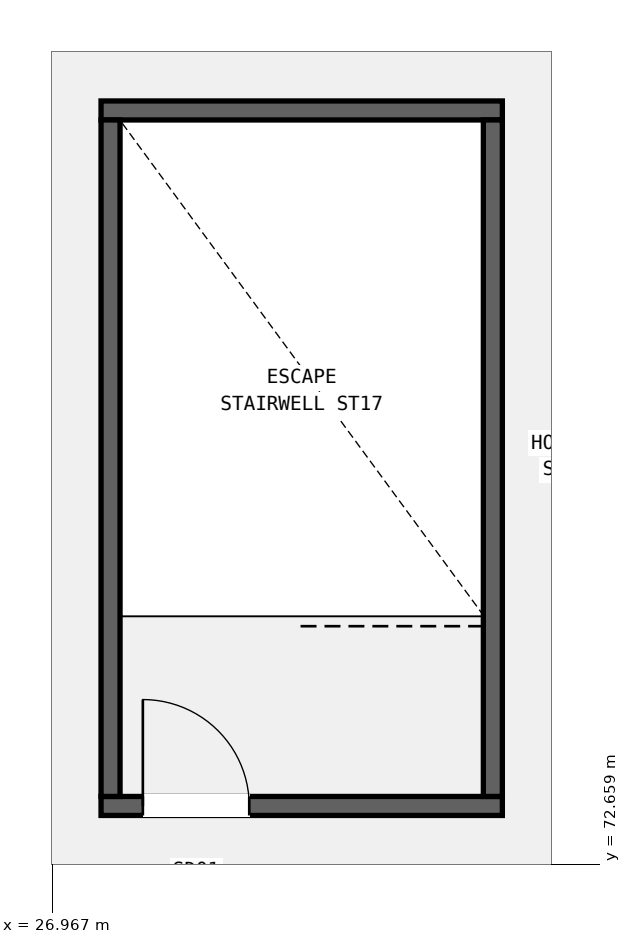
"""IFC4 building model, lengths in metres.
Left out: names, types, materials, properties, quantities, classifications, styles, units other than length and angle.
Written with IfcOpenShell. Run it as: python <this file> out.ifc"""

import sys

from ifc_helpers import new_model, si_unit, direction, frame, frame_2d, origin, place, context, subcontext, project, spatial, rectangle, extrude, element, fill, save


model = new_model("IFC4")
c1 = context("Model", 3, precision=1e-05, world=origin(), true_north=direction((0.0, 1.0)))
c2 = subcontext(c1, "Body", "Model", "MODEL_VIEW")
j1 = project(units=[si_unit("LENGTHUNIT", "METRE"), si_unit("PLANEANGLEUNIT", "RADIAN")], contexts=[c1])
p1 = place(None, origin())
s1 = spatial("IfcSite", under=j1, at=p1, CompositionType="ELEMENT")
p2 = place(p1, origin())
s2 = spatial("IfcBuilding", under=s1, at=p2, CompositionType="ELEMENT")
p3 = place(p2, frame((0.0, 0.0, 20.4)))
s3 = spatial("IfcBuildingStorey", under=s2, at=p3, CompositionType="ELEMENT", Elevation=20.4)
p4 = place(p3, frame((27.61, 73.425, 0.0), z_axis=(0.0, 0.0, 1.0), x_axis=(1.0, 0.0, 0.0)))
e1 = element("IfcWall", 1, at=p4, inside=s3, PredefinedType="SHEAR", context=c2, shape_type="SweptSolid", body=[
    extrude(rectangle(XDim=5.28, YDim=0.25, at=frame_2d((2.64, 0.0))), origin(), (0.0, 0.0, 1.0), 5.18),
])
p5 = place(p4, frame((0.55, 0.0, 0.0)))
e2 = element("IfcOpeningElement", 2, at=p5, cuts=e1, PredefinedType="OPENING", context=c2, shape_type="SweptSolid", body=[
    extrude(rectangle(XDim=1.4, YDim=2.15, at=frame_2d((0.7, 1.075))), frame((0.0, 0.135, 0.0), z_axis=(0.0, -1.0, 0.0), x_axis=(1.0, 0.0, 0.0)), (0.0, 0.0, 1.0), 0.27),
])
p6 = place(p3, frame((27.61, 82.575, 0.0), z_axis=(0.0, 0.0, 1.0), x_axis=(1.0, 0.0, 0.0)))
e3 = element("IfcWall", 3, at=p6, inside=s3, PredefinedType="SHEAR", context=c2, shape_type="SweptSolid", body=[
    extrude(rectangle(XDim=5.28, YDim=0.25, at=frame_2d((2.64, 0.0))), origin(), (0.0, 0.0, 1.0), 5.18),
])
for number, where, z_axis, x_axis in (
    (4, (27.735, 73.55, 0.0), (0.0, 0.0, 1.0), (0.0, 1.0, 0.0)),
    (5, (32.765, 73.55, 0.0), (0.0, 0.0, 1.0), (0.0, 1.0, 0.0)),
):
    element("IfcWall", number, at=place(p3, frame(where, z_axis=z_axis, x_axis=x_axis)), inside=s3, PredefinedType="SHEAR", context=c2, shape_type="SweptSolid", body=[
        extrude(rectangle(XDim=8.9, YDim=0.25, at=frame_2d((4.45, 0.0))), origin(), (0.0, 0.0, 1.0), 5.18),
    ])
p7 = place(p5, origin())
e6 = element("IfcDoor", 6, at=p7, inside=s3, OperationType="SINGLE_SWING_LEFT", PredefinedType="DOOR", context=c2, shape_type="SweptSolid", body=[
    extrude(rectangle(XDim=1.4, YDim=2.15, at=frame_2d((0.7, 1.075))), frame((0.0, 0.025, 0.0), z_axis=(0.0, -1.0, 0.0), x_axis=(1.0, 0.0, 0.0)), (0.0, 0.0, 1.0), 0.05),
])
fill(e2, e6)
save(model, sys.argv[1])
